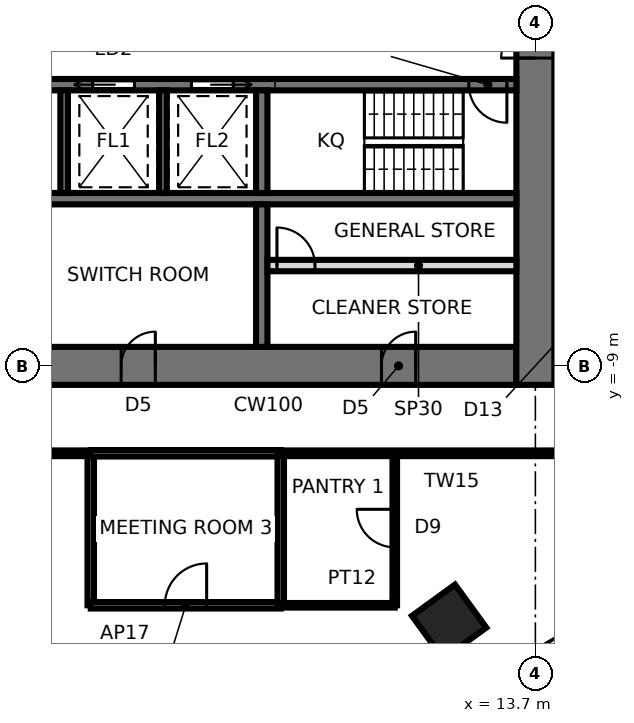
"""IFC4 building model, lengths in metres.
Left out: names, types, materials, properties, quantities, classifications, styles, units other than length and angle.
Written with IfcOpenShell. Run it as: python <this file> out.ifc"""

import sys

from ifc_helpers import new_model, si_unit, direction, frame, frame_2d, origin, origin_2d, place, context, subcontext, project, spatial, rectangle, extrude, element, fill, save


model = new_model("IFC4")
c1 = context("Model", 3, precision=1e-05, world=origin(), true_north=direction((0.0, 1.0)))
c2 = subcontext(c1, "Body", "Model", "MODEL_VIEW")
j1 = project(units=[si_unit("LENGTHUNIT", "METRE"), si_unit("PLANEANGLEUNIT", "RADIAN")], contexts=[c1])
p1 = place(None, origin())
s1 = spatial("IfcSite", under=j1, at=p1, CompositionType="ELEMENT")
p2 = place(p1, origin())
s2 = spatial("IfcBuilding", under=s1, at=p2, CompositionType="ELEMENT")
p3 = place(p2, frame((0.0, 0.0, 207.2)))
s3 = spatial("IfcBuildingStorey", under=s2, at=p3, CompositionType="ELEMENT", Elevation=207.2)
p4 = place(p3, frame((11.43, -15.733, 0.0), z_axis=(0.0, 0.0, 1.0), x_axis=(0.587785252292, -0.809016994375, 0.0)))
e1 = element("IfcColumn", 1, at=p4, inside=s3, PredefinedType="COLUMN", context=c2, shape_type="SweptSolid", body=[
    extrude(rectangle(XDim=1.4, YDim=1.4, at=origin_2d()), origin(), (0.0, 0.0, 1.0), 3.9),
])
p5 = place(p3, frame((-13.2, -9.0, 0.0), z_axis=(0.0, 0.0, 1.0), x_axis=(1.0, 0.0, 0.0)))
e2 = element("IfcWall", 2, at=p5, inside=s3, PredefinedType="SHEAR", context=c2, shape_type="SweptSolid", body=[
    extrude(rectangle(XDim=26.4, YDim=1.0, at=frame_2d((13.2, 0.0))), origin(), (0.0, 0.0, 1.0), 3.9),
])
p6 = place(p5, frame((2.65, 0.0, 0.0)))
e3 = element("IfcOpeningElement", 3, at=p6, cuts=e2, PredefinedType="OPENING", context=c2, shape_type="SweptSolid", body=[
    extrude(rectangle(XDim=0.9, YDim=2.1, at=frame_2d((0.45, 1.05))), frame((0.0, 0.51, 0.0), z_axis=(0.0, -1.0, 0.0), x_axis=(1.0, 0.0, 0.0)), (0.0, 0.0, 1.0), 1.02),
])
p7 = place(p5, frame((9.5, 0.0, 0.0)))
e4 = element("IfcOpeningElement", 4, at=p7, cuts=e2, PredefinedType="OPENING", context=c2, shape_type="SweptSolid", body=[
    extrude(rectangle(XDim=0.9, YDim=2.1, at=frame_2d((0.45, 1.05))), frame((0.0, 0.51, 0.0), z_axis=(0.0, -1.0, 0.0), x_axis=(1.0, 0.0, 0.0)), (0.0, 0.0, 1.0), 1.02),
])
p8 = place(p5, frame((16.0, 0.0, 0.0)))
e5 = element("IfcOpeningElement", 5, at=p8, cuts=e2, PredefinedType="OPENING", context=c2, shape_type="SweptSolid", body=[
    extrude(rectangle(XDim=0.9, YDim=2.1, at=frame_2d((0.45, 1.05))), frame((0.0, 0.51, 0.0), z_axis=(0.0, -1.0, 0.0), x_axis=(1.0, 0.0, 0.0)), (0.0, 0.0, 1.0), 1.02),
])
p9 = place(p5, frame((22.85, 0.0, 0.0)))
e6 = element("IfcOpeningElement", 6, at=p9, cuts=e2, PredefinedType="OPENING", context=c2, shape_type="SweptSolid", body=[
    extrude(rectangle(XDim=0.9, YDim=2.1, at=frame_2d((0.45, 1.05))), frame((0.0, 0.51, 0.0), z_axis=(0.0, -1.0, 0.0), x_axis=(1.0, 0.0, 0.0)), (0.0, 0.0, 1.0), 1.02),
])
p10 = place(p3, frame((13.7, -9.5, 0.0), z_axis=(0.0, 0.0, 1.0), x_axis=(0.0, 1.0, 0.0)))
e7 = element("IfcWall", 7, at=p10, inside=s3, PredefinedType="SHEAR", context=c2, shape_type="SweptSolid", body=[
    extrude(rectangle(XDim=19.0, YDim=1.0, at=frame_2d((9.5, 0.0))), origin(), (0.0, 0.0, 1.0), 3.9),
])
p11 = place(p10, frame((8.6, 0.0, 0.0)))
e8 = element("IfcOpeningElement", 8, at=p11, cuts=e7, PredefinedType="OPENING", context=c2, shape_type="SweptSolid", body=[
    extrude(rectangle(XDim=1.8, YDim=2.4, at=frame_2d((0.9, 1.2))), frame((0.0, 0.51, 0.0), z_axis=(0.0, -1.0, 0.0), x_axis=(1.0, 0.0, 0.0)), (0.0, 0.0, 1.0), 1.02),
])
p12 = place(p3, frame((-13.2, -1.6, 0.0), z_axis=(0.0, 0.0, 1.0), x_axis=(1.0, 0.0, 0.0)))
e9 = element("IfcWall", 9, at=p12, inside=s3, PredefinedType="SHEAR", context=c2, shape_type="SweptSolid", body=[
    extrude(rectangle(XDim=26.4, YDim=0.3, at=frame_2d((13.2, 0.0))), origin(), (0.0, 0.0, 1.0), 3.9),
])
p13 = place(p12, frame((25.15, 0.0, 0.0)))
e10 = element("IfcOpeningElement", 10, at=p13, cuts=e9, PredefinedType="OPENING", context=c2, shape_type="SweptSolid", body=[
    extrude(rectangle(XDim=1.0, YDim=2.1, at=frame_2d((0.5, 1.05))), frame((0.0, 0.16, 0.0), z_axis=(0.0, -1.0, 0.0), x_axis=(1.0, 0.0, 0.0)), (0.0, 0.0, 1.0), 0.32),
])
p14 = place(p12, frame((6.95, 0.0, 0.0)))
e11 = element("IfcOpeningElement", 11, at=p14, cuts=e9, PredefinedType="OPENING", context=c2, shape_type="SweptSolid", body=[
    extrude(rectangle(XDim=0.9, YDim=2.1, at=frame_2d((0.45, 1.05))), frame((0.0, 0.16, 0.0), z_axis=(0.0, -1.0, 0.0), x_axis=(1.0, 0.0, 0.0)), (0.0, 0.0, 1.0), 0.32),
])
p15 = place(p12, frame((9.55, 0.0, 0.0)))
e12 = element("IfcOpeningElement", 12, at=p15, cuts=e9, PredefinedType="OPENING", context=c2, shape_type="SweptSolid", body=[
    extrude(rectangle(XDim=0.9, YDim=2.1, at=frame_2d((0.45, 1.05))), frame((0.0, 0.16, 0.0), z_axis=(0.0, -1.0, 0.0), x_axis=(1.0, 0.0, 0.0)), (0.0, 0.0, 1.0), 0.32),
])
p16 = place(p12, frame((12.75, 0.0, 0.0)))
e13 = element("IfcOpeningElement", 13, at=p16, cuts=e9, PredefinedType="OPENING", context=c2, shape_type="SweptSolid", body=[
    extrude(rectangle(XDim=0.9, YDim=2.1, at=frame_2d((0.45, 1.05))), frame((0.0, 0.16, 0.0), z_axis=(0.0, -1.0, 0.0), x_axis=(1.0, 0.0, 0.0)), (0.0, 0.0, 1.0), 0.32),
])
p17 = place(p12, frame((15.25, 0.0, 0.0)))
e14 = element("IfcOpeningElement", 14, at=p17, cuts=e9, PredefinedType="OPENING", context=c2, shape_type="SweptSolid", body=[
    extrude(rectangle(XDim=1.1, YDim=2.3, at=frame_2d((0.55, 1.15))), frame((0.0, 0.16, 0.0), z_axis=(0.0, -1.0, 0.0), x_axis=(1.0, 0.0, 0.0)), (0.0, 0.0, 1.0), 0.32),
])
p18 = place(p12, frame((17.85, 0.0, 0.0)))
e15 = element("IfcOpeningElement", 15, at=p18, cuts=e9, PredefinedType="OPENING", context=c2, shape_type="SweptSolid", body=[
    extrude(rectangle(XDim=1.1, YDim=2.3, at=frame_2d((0.55, 1.15))), frame((0.0, 0.16, 0.0), z_axis=(0.0, -1.0, 0.0), x_axis=(1.0, 0.0, 0.0)), (0.0, 0.0, 1.0), 0.32),
])
p19 = place(p12, frame((4.85, 0.0, 0.0)))
e16 = element("IfcOpeningElement", 16, at=p19, cuts=e9, PredefinedType="OPENING", context=c2, shape_type="SweptSolid", body=[
    extrude(rectangle(XDim=1.1, YDim=2.3, at=frame_2d((0.55, 1.15))), frame((0.0, 0.16, 0.0), z_axis=(0.0, -1.0, 0.0), x_axis=(1.0, 0.0, 0.0)), (0.0, 0.0, 1.0), 0.32),
])
p20 = place(p12, frame((2.25, 0.0, 0.0)))
e17 = element("IfcOpeningElement", 17, at=p20, cuts=e9, PredefinedType="OPENING", context=c2, shape_type="SweptSolid", body=[
    extrude(rectangle(XDim=1.1, YDim=2.3, at=frame_2d((0.55, 1.15))), frame((0.0, 0.16, 0.0), z_axis=(0.0, -1.0, 0.0), x_axis=(1.0, 0.0, 0.0)), (0.0, 0.0, 1.0), 0.32),
])
p21 = place(p12, frame((0.35, 0.0, 0.0)))
e18 = element("IfcOpeningElement", 18, at=p21, cuts=e9, PredefinedType="OPENING", context=c2, shape_type="SweptSolid", body=[
    extrude(rectangle(XDim=0.9, YDim=2.1, at=frame_2d((0.45, 1.05))), frame((0.0, 0.16, 0.0), z_axis=(0.0, -1.0, 0.0), x_axis=(1.0, 0.0, 0.0)), (0.0, 0.0, 1.0), 0.32),
])
p22 = place(p3, frame((-13.2, -4.6, 0.0), z_axis=(0.0, 0.0, 1.0), x_axis=(1.0, 0.0, 0.0)))
e19 = element("IfcWall", 19, at=p22, inside=s3, PredefinedType="SHEAR", context=c2, shape_type="SweptSolid", body=[
    extrude(rectangle(XDim=26.4, YDim=0.3, at=frame_2d((13.2, 0.0))), origin(), (0.0, 0.0, 1.0), 3.9),
])
p23 = place(p3, frame((6.5, -1.75, 0.0), z_axis=(0.0, 0.0, 1.0), x_axis=(0.0, -1.0, 0.0)))
e20 = element("IfcWall", 20, at=p23, inside=s3, PredefinedType="SHEAR", context=c2, shape_type="SweptSolid", body=[
    extrude(rectangle(XDim=2.7, YDim=0.3, at=frame_2d((1.35, 0.0))), origin(), (0.0, 0.0, 1.0), 3.9),
])
p24 = place(p3, frame((6.5, -4.75, 0.0), z_axis=(0.0, 0.0, 1.0), x_axis=(0.0, -1.0, 0.0)))
e21 = element("IfcWall", 21, at=p24, inside=s3, PredefinedType="SHEAR", context=c2, shape_type="SweptSolid", body=[
    extrude(rectangle(XDim=3.75, YDim=0.3, at=frame_2d((1.875, 0.0))), origin(), (0.0, 0.0, 1.0), 3.9),
])
for number, where, z_axis, x_axis in (
    (22, (1.3, -1.75, 0.0), (0.0, 0.0, 1.0), (0.0, -1.0, 0.0)),
    (23, (3.9, -1.75, 0.0), (0.0, 0.0, 1.0), (0.0, -1.0, 0.0)),
):
    element("IfcWall", number, at=place(p3, frame(where, z_axis=z_axis, x_axis=x_axis)), inside=s3, PredefinedType="SHEAR", context=c2, shape_type="SweptSolid", body=[
        extrude(rectangle(XDim=2.7, YDim=0.2, at=frame_2d((1.35, 0.0))), origin(), (0.0, 0.0, 1.0), 3.9),
    ])
p25 = place(p3, frame((6.65, -6.36, 0.0), z_axis=(0.0, 0.0, 1.0), x_axis=(1.0, 0.0, 0.0)))
e24 = element("IfcWall", 24, at=p25, inside=s3, PredefinedType="PARTITIONING", context=c2, shape_type="SweptSolid", body=[
    extrude(rectangle(XDim=6.55, YDim=0.3, at=frame_2d((3.275, 0.0))), origin(), (0.0, 0.0, 1.0), 3.74),
])
p26 = place(p25, frame((0.25, 0.0, 0.0)))
e25 = element("IfcOpeningElement", 25, at=p26, cuts=e24, PredefinedType="OPENING", context=c2, shape_type="SweptSolid", body=[
    extrude(rectangle(XDim=1.0, YDim=2.4, at=frame_2d((0.5, 1.2))), frame((0.0, 0.16, 0.0), z_axis=(0.0, -1.0, 0.0), x_axis=(1.0, 0.0, 0.0)), (0.0, 0.0, 1.0), 0.32),
])
p27 = place(p3, frame((-14.2, -11.3, 0.0), z_axis=(0.0, 0.0, 1.0), x_axis=(1.0, 0.0, 0.0)))
e26 = element("IfcWall", 26, at=p27, inside=s3, PredefinedType="PARTITIONING", context=c2, shape_type="SweptSolid", body=[
    extrude(rectangle(XDim=16.2, YDim=0.15, at=frame_2d((8.1, 0.0))), origin(), (0.0, 0.0, 1.0), 3.74),
])
p28 = place(p3, frame((2.0, -11.3, 0.0), z_axis=(0.0, 0.0, 1.0), x_axis=(0.0, -1.0, 0.0)))
e27 = element("IfcWall", 27, at=p28, inside=s3, PredefinedType="PARTITIONING", context=c2, shape_type="SweptSolid", body=[
    extrude(rectangle(XDim=4.0, YDim=0.17, at=frame_2d((2.0, 0.0))), origin(), (0.0, 0.0, 1.0), 3.74),
])
p29 = place(p3, frame((2.0, -15.3, 0.0), z_axis=(0.0, 0.0, 1.0), x_axis=(1.0, 0.0, 0.0)))
e28 = element("IfcWall", 28, at=p29, inside=s3, PredefinedType="PARTITIONING", context=c2, shape_type="SweptSolid", body=[
    extrude(rectangle(XDim=5.0, YDim=0.17, at=frame_2d((2.5, 0.0))), origin(), (0.0, 0.0, 1.0), 3.334),
])
p30 = place(p29, frame((1.95, 0.0, 0.0)))
e29 = element("IfcOpeningElement", 29, at=p30, cuts=e28, PredefinedType="OPENING", context=c2, shape_type="SweptSolid", body=[
    extrude(rectangle(XDim=1.1, YDim=2.4, at=frame_2d((0.55, 1.2))), frame((0.0, 0.095, 0.0), z_axis=(0.0, -1.0, 0.0), x_axis=(1.0, 0.0, 0.0)), (0.0, 0.0, 1.0), 0.19),
])
p31 = place(p3, frame((7.0, -11.3, 0.0), z_axis=(0.0, 0.0, 1.0), x_axis=(-1.0, 0.0, 0.0)))
e30 = element("IfcWall", 30, at=p31, inside=s3, PredefinedType="PARTITIONING", context=c2, shape_type="SweptSolid", body=[
    extrude(rectangle(XDim=5.0, YDim=0.17, at=frame_2d((2.5, 0.0))), origin(), (0.0, 0.0, 1.0), 3.74),
])
p32 = place(p3, frame((7.0, -11.3, 0.0), z_axis=(0.0, 0.0, 1.0), x_axis=(0.0, -1.0, 0.0)))
e31 = element("IfcWall", 31, at=p32, inside=s3, PredefinedType="PARTITIONING", context=c2, shape_type="SweptSolid", body=[
    extrude(rectangle(XDim=4.0, YDim=0.17, at=frame_2d((2.0, 0.0))), origin(), (0.0, 0.0, 1.0), 3.74),
])
p33 = place(p3, frame((7.0, -15.3, 0.0), z_axis=(0.0, 0.0, 1.0), x_axis=(1.0, 0.0, 0.0)))
e32 = element("IfcWall", 32, at=p33, inside=s3, PredefinedType="PARTITIONING", context=c2, shape_type="SweptSolid", body=[
    extrude(rectangle(XDim=3.0, YDim=0.12, at=frame_2d((1.5, 0.0))), origin(), (0.0, 0.0, 1.0), 3.74),
])
p34 = place(p3, frame((10.0, -15.3, 0.0), z_axis=(0.0, 0.0, 1.0), x_axis=(0.0, 1.0, 0.0)))
e33 = element("IfcWall", 33, at=p34, inside=s3, PredefinedType="PARTITIONING", context=c2, shape_type="SweptSolid", body=[
    extrude(rectangle(XDim=4.0, YDim=0.12, at=frame_2d((2.0, 0.0))), origin(), (0.0, 0.0, 1.0), 3.74),
])
p35 = place(p34, frame((1.526, 0.0, 0.0)))
e34 = element("IfcOpeningElement", 34, at=p35, cuts=e33, PredefinedType="OPENING", context=c2, shape_type="SweptSolid", body=[
    extrude(rectangle(XDim=1.0, YDim=2.4, at=frame_2d((0.5, 1.2))), frame((0.0, 0.07, 0.0), z_axis=(0.0, -1.0, 0.0), x_axis=(1.0, 0.0, 0.0)), (0.0, 0.0, 1.0), 0.14),
])
p36 = place(p3, frame((7.0, -11.3, 0.0), z_axis=(0.0, 0.0, 1.0), x_axis=(1.0, 0.0, 0.0)))
e35 = element("IfcWall", 35, at=p36, inside=s3, PredefinedType="PARTITIONING", context=c2, shape_type="SweptSolid", body=[
    extrude(rectangle(XDim=9.0, YDim=0.15, at=frame_2d((4.5, 0.0))), origin(), (0.0, 0.0, 1.0), 3.74),
])
p37 = place(p11, origin())
e36 = element("IfcDoor", 36, at=p37, inside=s3, OperationType="DOUBLE_DOOR_SINGLE_SWING", PredefinedType="DOOR", context=c2, shape_type="SweptSolid", body=[
    extrude(rectangle(XDim=1.72, YDim=2.36, at=frame_2d((0.9, 1.18))), frame((0.0, 0.025, 0.0), z_axis=(0.0, -1.0, 0.0), x_axis=(1.0, 0.0, 0.0)), (0.0, 0.0, 1.0), 0.05),
    extrude(rectangle(XDim=0.04, YDim=2.4, at=frame_2d((0.02, 1.2))), frame((0.0, 0.25, 0.0), z_axis=(0.0, -1.0, 0.0), x_axis=(1.0, 0.0, 0.0)), (0.0, 0.0, 1.0), 0.5),
    extrude(rectangle(XDim=0.04, YDim=2.4, at=frame_2d((1.78, 1.2))), frame((0.0, 0.25, 0.0), z_axis=(0.0, -1.0, 0.0), x_axis=(1.0, 0.0, 0.0)), (0.0, 0.0, 1.0), 0.5),
    extrude(rectangle(XDim=1.72, YDim=0.04, at=frame_2d((0.9, 2.38))), frame((0.0, 0.25, 0.0), z_axis=(0.0, -1.0, 0.0), x_axis=(1.0, 0.0, 0.0)), (0.0, 0.0, 1.0), 0.5),
])
fill(e8, e36)
p38 = place(p13, frame((1.0, 0.0, 0.0), z_axis=(0.0, 0.0, 1.0), x_axis=(-1.0, 0.0, 0.0)))
e37 = element("IfcDoor", 37, at=p38, inside=s3, OperationType="SINGLE_SWING_LEFT", PredefinedType="DOOR", context=c2, shape_type="SweptSolid", body=[
    extrude(rectangle(XDim=1.0, YDim=2.1, at=frame_2d((0.5, 1.05))), frame((0.0, 0.025, 0.0), z_axis=(0.0, -1.0, 0.0), x_axis=(1.0, 0.0, 0.0)), (0.0, 0.0, 1.0), 0.05),
])
fill(e10, e37)
p39 = place(p17, frame((1.1, 0.0, 0.0), z_axis=(0.0, 0.0, 1.0), x_axis=(-1.0, 0.0, 0.0)))
e38 = element("IfcDoor", 38, at=p39, inside=s3, OperationType="SLIDING_TO_RIGHT", PredefinedType="DOOR", context=c2, shape_type="SweptSolid", body=[
    extrude(rectangle(XDim=1.1, YDim=2.3, at=frame_2d((0.55, 1.15))), frame((0.0, 0.025, 0.0), z_axis=(0.0, -1.0, 0.0), x_axis=(1.0, 0.0, 0.0)), (0.0, 0.0, 1.0), 0.05),
])
fill(e14, e38)
p40 = place(p18, frame((1.1, 0.0, 0.0), z_axis=(0.0, 0.0, 1.0), x_axis=(-1.0, 0.0, 0.0)))
e39 = element("IfcDoor", 39, at=p40, inside=s3, OperationType="SLIDING_TO_LEFT", PredefinedType="DOOR", context=c2, shape_type="SweptSolid", body=[
    extrude(rectangle(XDim=1.1, YDim=2.3, at=frame_2d((0.55, 1.15))), frame((0.0, 0.025, 0.0), z_axis=(0.0, -1.0, 0.0), x_axis=(1.0, 0.0, 0.0)), (0.0, 0.0, 1.0), 0.05),
])
fill(e15, e39)
p41 = place(p8, origin())
e40 = element("IfcDoor", 40, at=p41, inside=s3, OperationType="SINGLE_SWING_RIGHT", PredefinedType="DOOR", context=c2, shape_type="SweptSolid", body=[
    extrude(rectangle(XDim=0.82, YDim=2.06, at=frame_2d((0.45, 1.03))), frame((0.0, 0.025, 0.0), z_axis=(0.0, -1.0, 0.0), x_axis=(1.0, 0.0, 0.0)), (0.0, 0.0, 1.0), 0.05),
    extrude(rectangle(XDim=0.04, YDim=2.1, at=frame_2d((0.02, 1.05))), frame((0.0, 0.25, 0.0), z_axis=(0.0, -1.0, 0.0), x_axis=(1.0, 0.0, 0.0)), (0.0, 0.0, 1.0), 0.5),
    extrude(rectangle(XDim=0.04, YDim=2.1, at=frame_2d((0.88, 1.05))), frame((0.0, 0.25, 0.0), z_axis=(0.0, -1.0, 0.0), x_axis=(1.0, 0.0, 0.0)), (0.0, 0.0, 1.0), 0.5),
    extrude(rectangle(XDim=0.82, YDim=0.04, at=frame_2d((0.45, 2.08))), frame((0.0, 0.25, 0.0), z_axis=(0.0, -1.0, 0.0), x_axis=(1.0, 0.0, 0.0)), (0.0, 0.0, 1.0), 0.5),
])
fill(e5, e40)
p42 = place(p9, origin())
e41 = element("IfcDoor", 41, at=p42, inside=s3, OperationType="SINGLE_SWING_RIGHT", PredefinedType="DOOR", context=c2, shape_type="SweptSolid", body=[
    extrude(rectangle(XDim=0.82, YDim=2.06, at=frame_2d((0.45, 1.03))), frame((0.0, 0.025, 0.0), z_axis=(0.0, -1.0, 0.0), x_axis=(1.0, 0.0, 0.0)), (0.0, 0.0, 1.0), 0.05),
    extrude(rectangle(XDim=0.04, YDim=2.1, at=frame_2d((0.02, 1.05))), frame((0.0, 0.25, 0.0), z_axis=(0.0, -1.0, 0.0), x_axis=(1.0, 0.0, 0.0)), (0.0, 0.0, 1.0), 0.5),
    extrude(rectangle(XDim=0.04, YDim=2.1, at=frame_2d((0.88, 1.05))), frame((0.0, 0.25, 0.0), z_axis=(0.0, -1.0, 0.0), x_axis=(1.0, 0.0, 0.0)), (0.0, 0.0, 1.0), 0.5),
    extrude(rectangle(XDim=0.82, YDim=0.04, at=frame_2d((0.45, 2.08))), frame((0.0, 0.25, 0.0), z_axis=(0.0, -1.0, 0.0), x_axis=(1.0, 0.0, 0.0)), (0.0, 0.0, 1.0), 0.5),
])
fill(e6, e41)
p43 = place(p26, origin())
e42 = element("IfcDoor", 42, at=p43, inside=s3, OperationType="SINGLE_SWING_LEFT", PredefinedType="DOOR", context=c2, shape_type="SweptSolid", body=[
    extrude(rectangle(XDim=1.0, YDim=2.4, at=frame_2d((0.5, 1.2))), frame((0.0, 0.025, 0.0), z_axis=(0.0, -1.0, 0.0), x_axis=(1.0, 0.0, 0.0)), (0.0, 0.0, 1.0), 0.05),
])
fill(e25, e42)
p44 = place(p30, origin())
e43 = element("IfcDoor", 43, at=p44, inside=s3, OperationType="SINGLE_SWING_RIGHT", PredefinedType="DOOR", context=c2, shape_type="SweptSolid", body=[
    extrude(rectangle(XDim=1.1, YDim=2.4, at=frame_2d((0.55, 1.2))), frame((0.0, 0.025, 0.0), z_axis=(0.0, -1.0, 0.0), x_axis=(1.0, 0.0, 0.0)), (0.0, 0.0, 1.0), 0.05),
])
fill(e29, e43)
p45 = place(p35, origin())
e44 = element("IfcDoor", 44, at=p45, inside=s3, OperationType="SINGLE_SWING_RIGHT", PredefinedType="DOOR", context=c2, shape_type="SweptSolid", body=[
    extrude(rectangle(XDim=1.0, YDim=2.4, at=frame_2d((0.5, 1.2))), frame((0.0, 0.025, 0.0), z_axis=(0.0, -1.0, 0.0), x_axis=(1.0, 0.0, 0.0)), (0.0, 0.0, 1.0), 0.05),
])
fill(e34, e44)
save(model, sys.argv[1])
